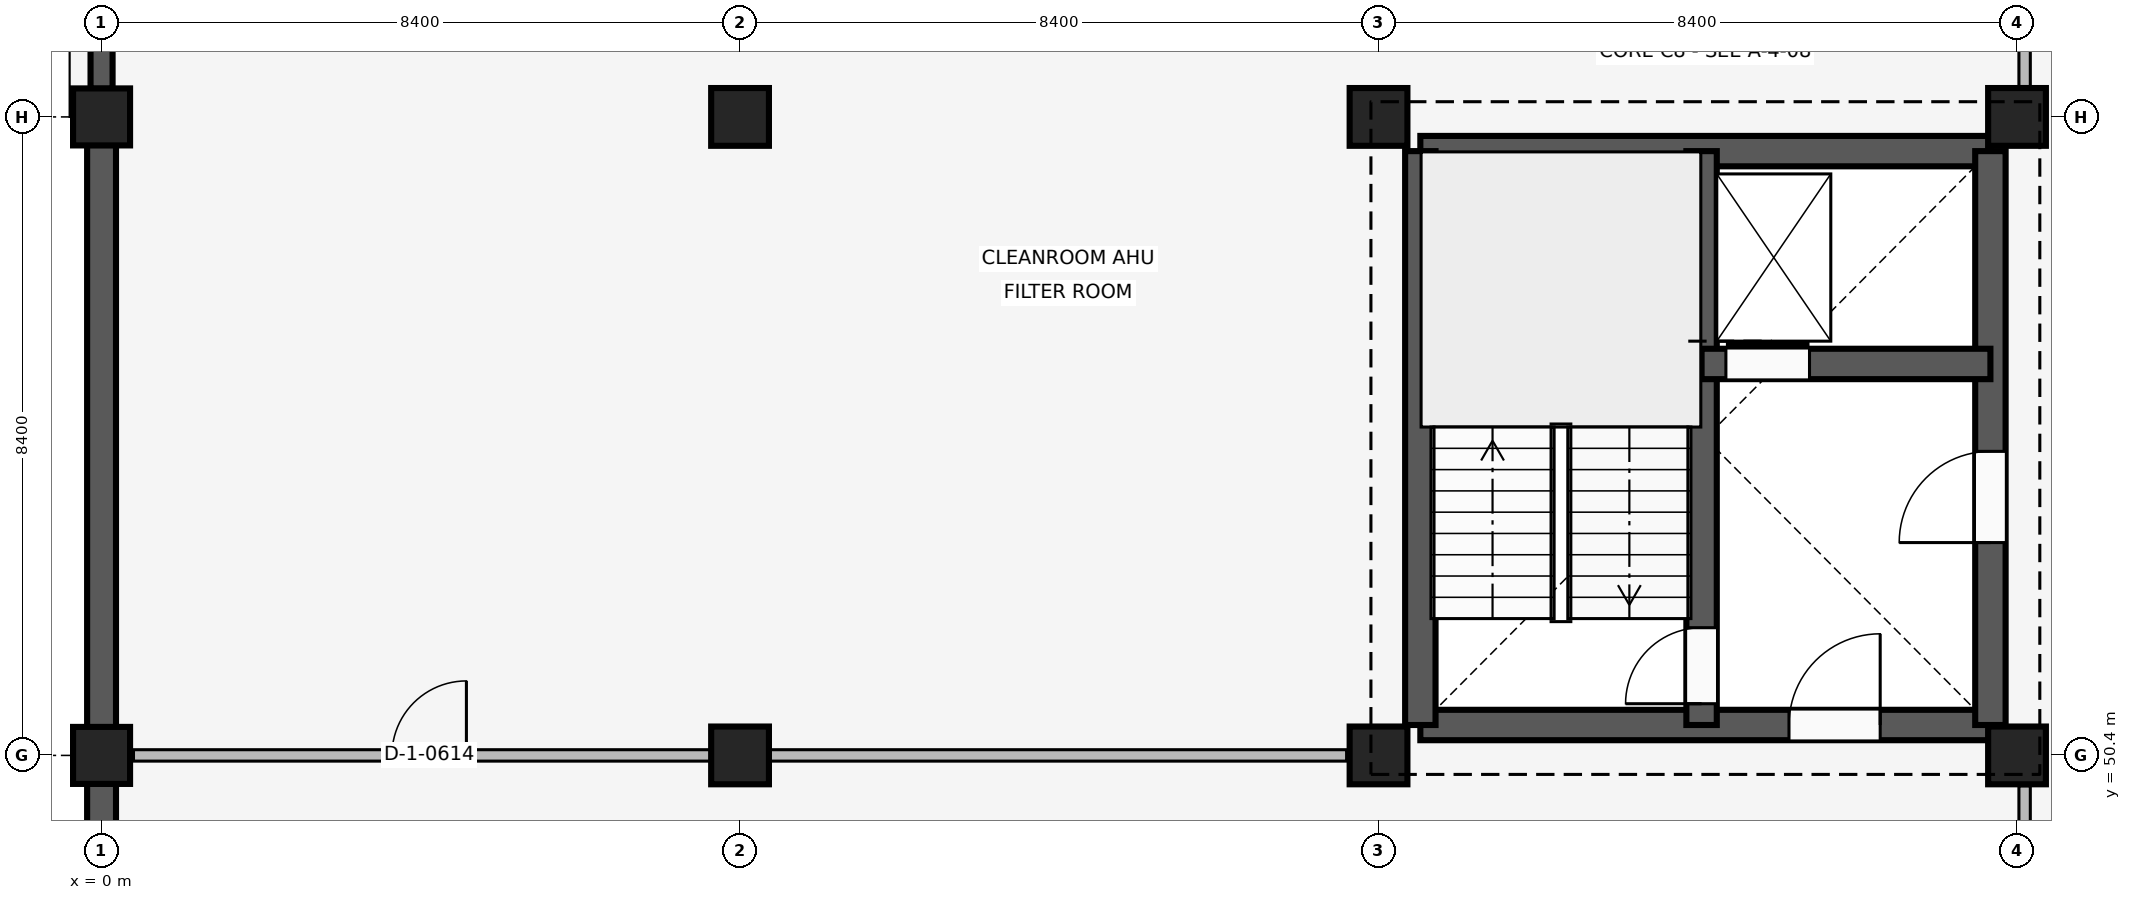
"""IFC4 building model, lengths in metres.
Left out: names, types, materials, properties, quantities, classifications, styles, units other than length and angle.
Written with IfcOpenShell. Run it as: python <this file> out.ifc"""

import sys

from ifc_helpers import new_model, si_unit, direction, frame, frame_2d, origin, origin_2d, place, context, subcontext, project, spatial, rectangle, extrude, element, fill, save


model = new_model("IFC4")
c1 = context("Model", 3, precision=1e-05, world=origin(), true_north=direction((0.0, 1.0)))
c2 = subcontext(c1, "Body", "Model", "MODEL_VIEW")
j1 = project(units=[si_unit("LENGTHUNIT", "METRE"), si_unit("PLANEANGLEUNIT", "RADIAN")], contexts=[c1])
p1 = place(None, origin())
s1 = spatial("IfcSite", under=j1, at=p1, CompositionType="ELEMENT")
p2 = place(p1, origin())
s2 = spatial("IfcBuilding", under=s1, at=p2, CompositionType="ELEMENT")
p3 = place(p2, frame((0.0, 0.0, 4.8)))
s3 = spatial("IfcBuildingStorey", under=s2, at=p3, CompositionType="ELEMENT", Elevation=4.8)
for number, where, z_axis, x_axis in (
    (1, (0.0, 50.4, 0.0), (0.0, 0.0, 1.0), (1.0, 0.0, 0.0)),
    (2, (0.0, 58.8, 0.0), (0.0, 0.0, 1.0), (1.0, 0.0, 0.0)),
):
    element("IfcColumn", number, at=place(p3, frame(where, z_axis=z_axis, x_axis=x_axis)), inside=s3, PredefinedType="COLUMN", context=c2, shape_type="SweptSolid", body=[
        extrude(rectangle(XDim=0.75, YDim=0.75, at=origin_2d()), origin(), (0.0, 0.0, 1.0), 3.3),
    ])
for number, where, z_axis, x_axis in (
    (3, (8.4, 50.4, 0.0), (0.0, 0.0, 1.0), (1.0, 0.0, 0.0)),
    (4, (8.4, 58.8, 0.0), (0.0, 0.0, 1.0), (1.0, 0.0, 0.0)),
    (5, (16.8, 50.4, 0.0), (0.0, 0.0, 1.0), (1.0, 0.0, 0.0)),
    (6, (16.8, 58.8, 0.0), (0.0, 0.0, 1.0), (1.0, 0.0, 0.0)),
    (7, (25.2, 50.4, 0.0), (0.0, 0.0, 1.0), (1.0, 0.0, 0.0)),
    (8, (25.2, 58.8, 0.0), (0.0, 0.0, 1.0), (1.0, 0.0, 0.0)),
):
    element("IfcColumn", number, at=place(p3, frame(where, z_axis=z_axis, x_axis=x_axis)), inside=s3, PredefinedType="COLUMN", context=c2, shape_type="SweptSolid", body=[
        extrude(rectangle(XDim=0.76, YDim=0.76, at=origin_2d()), origin(), (0.0, 0.0, 1.0), 3.3),
    ])
for number, where, z_axis, x_axis in (
    (9, (0.0, 42.37, 0.0), (0.0, 0.0, 1.0), (0.0, 1.0, 0.0)),
    (10, (0.0, 50.77, 0.0), (0.0, 0.0, 1.0), (0.0, 1.0, 0.0)),
):
    element("IfcWall", number, at=place(p3, frame(where, z_axis=z_axis, x_axis=x_axis)), inside=s3, PredefinedType="SOLIDWALL", context=c2, shape_type="SweptSolid", body=[
        extrude(rectangle(XDim=7.66, YDim=0.38, at=frame_2d((3.83, 0.0))), origin(), (0.0, 0.0, 1.0), 2.42),
    ])
p4 = place(p3, frame((0.0, 59.17, 0.0), z_axis=(0.0, 0.0, 1.0), x_axis=(0.0, 1.0, 0.0)))
e11 = element("IfcWall", 11, at=p4, inside=s3, PredefinedType="SOLIDWALL", context=c2, shape_type="SweptSolid", body=[
    extrude(rectangle(XDim=7.66, YDim=0.29, at=frame_2d((3.83, 0.0))), origin(), (0.0, 0.0, 1.0), 2.42),
])
p5 = place(p4, frame((1.188, 0.0, 1.05)))
e12 = element("IfcOpeningElement", 12, at=p5, cuts=e11, PredefinedType="OPENING", context=c2, shape_type="SweptSolid", body=[
    extrude(rectangle(XDim=1.3, YDim=0.75, at=frame_2d((0.65, 0.375))), frame((0.0, 0.155, 0.0), z_axis=(0.0, -1.0, 0.0), x_axis=(1.0, 0.0, 0.0)), (0.0, 0.0, 1.0), 0.31),
])
p6 = place(p4, frame((5.172, 0.0, 1.05)))
e13 = element("IfcOpeningElement", 13, at=p6, cuts=e11, PredefinedType="OPENING", context=c2, shape_type="SweptSolid", body=[
    extrude(rectangle(XDim=1.3, YDim=0.75, at=frame_2d((0.65, 0.375))), frame((0.0, 0.155, 0.0), z_axis=(0.0, -1.0, 0.0), x_axis=(1.0, 0.0, 0.0)), (0.0, 0.0, 1.0), 0.31),
])
p7 = place(p3, frame((17.35, 50.8, 0.0), z_axis=(0.0, 0.0, 1.0), x_axis=(1.0, 0.0, 0.0)))
e14 = element("IfcWall", 14, at=p7, inside=s3, PredefinedType="SHEAR", context=c2, shape_type="SweptSolid", body=[
    extrude(rectangle(XDim=7.5, YDim=0.4, at=frame_2d((3.75, 0.0))), origin(), (0.0, 0.0, 1.0), 3.02),
])
p8 = place(p7, frame((4.85, 0.0, 0.0)))
e15 = element("IfcOpeningElement", 15, at=p8, cuts=e14, PredefinedType="OPENING", context=c2, shape_type="SweptSolid", body=[
    extrude(rectangle(XDim=1.2, YDim=2.1, at=frame_2d((0.6, 1.05))), frame((0.0, 0.21, 0.0), z_axis=(0.0, -1.0, 0.0), x_axis=(1.0, 0.0, 0.0)), (0.0, 0.0, 1.0), 0.42),
])
p9 = place(p3, frame((17.35, 58.35, 0.0), z_axis=(0.0, 0.0, 1.0), x_axis=(1.0, 0.0, 0.0)))
e16 = element("IfcWall", 16, at=p9, inside=s3, PredefinedType="SHEAR", context=c2, shape_type="SweptSolid", body=[
    extrude(rectangle(XDim=7.5, YDim=0.4, at=frame_2d((3.75, 0.0))), origin(), (0.0, 0.0, 1.0), 3.02),
])
p10 = place(p3, frame((17.35, 50.8, 0.0), z_axis=(0.0, 0.0, 1.0), x_axis=(0.0, 1.0, 0.0)))
e17 = element("IfcWall", 17, at=p10, inside=s3, PredefinedType="SHEAR", context=c2, shape_type="SweptSolid", body=[
    extrude(rectangle(XDim=7.55, YDim=0.4, at=frame_2d((3.775, 0.0))), origin(), (0.0, 0.0, 1.0), 3.02),
])
p11 = place(p3, frame((24.85, 50.8, 0.0), z_axis=(0.0, 0.0, 1.0), x_axis=(0.0, 1.0, 0.0)))
e18 = element("IfcWall", 18, at=p11, inside=s3, PredefinedType="SHEAR", context=c2, shape_type="SweptSolid", body=[
    extrude(rectangle(XDim=7.55, YDim=0.4, at=frame_2d((3.775, 0.0))), origin(), (0.0, 0.0, 1.0), 3.02),
])
p12 = place(p11, frame((2.4, 0.0, 0.0)))
e19 = element("IfcOpeningElement", 19, at=p12, cuts=e18, PredefinedType="OPENING", context=c2, shape_type="SweptSolid", body=[
    extrude(rectangle(XDim=1.2, YDim=2.2, at=frame_2d((0.6, 1.1))), frame((0.0, 0.21, 0.0), z_axis=(0.0, -1.0, 0.0), x_axis=(1.0, 0.0, 0.0)), (0.0, 0.0, 1.0), 0.42),
])
p13 = place(p3, frame((21.05, 50.8, 0.0), z_axis=(0.0, 0.0, 1.0), x_axis=(0.0, 1.0, 0.0)))
e20 = element("IfcWall", 20, at=p13, inside=s3, PredefinedType="SHEAR", context=c2, shape_type="SweptSolid", body=[
    extrude(rectangle(XDim=7.55, YDim=0.4, at=frame_2d((3.775, 0.0))), origin(), (0.0, 0.0, 1.0), 3.02),
])
p14 = place(p13, frame((0.28, 0.0, 0.0)))
e21 = element("IfcOpeningElement", 21, at=p14, cuts=e20, PredefinedType="OPENING", context=c2, shape_type="SweptSolid", body=[
    extrude(rectangle(XDim=1.0, YDim=2.15, at=frame_2d((0.5, 1.075))), frame((0.0, 0.21, 0.0), z_axis=(0.0, -1.0, 0.0), x_axis=(1.0, 0.0, 0.0)), (0.0, 0.0, 1.0), 0.42),
])
p15 = place(p3, frame((21.05, 55.55, 0.0), z_axis=(0.0, 0.0, 1.0), x_axis=(1.0, 0.0, 0.0)))
e22 = element("IfcWall", 22, at=p15, inside=s3, PredefinedType="SHEAR", context=c2, shape_type="SweptSolid", body=[
    extrude(rectangle(XDim=3.8, YDim=0.4, at=frame_2d((1.9, 0.0))), origin(), (0.0, 0.0, 1.0), 3.02),
])
p16 = place(p15, frame((0.32, 0.0, 0.0)))
e23 = element("IfcOpeningElement", 23, at=p16, cuts=e22, PredefinedType="OPENING", context=c2, shape_type="SweptSolid", body=[
    extrude(rectangle(XDim=1.1, YDim=2.15, at=frame_2d((0.55, 1.075))), frame((0.0, 0.21, 0.0), z_axis=(0.0, -1.0, 0.0), x_axis=(1.0, 0.0, 0.0)), (0.0, 0.0, 1.0), 0.42),
])
p17 = place(p3, frame((25.3, 25.6, 0.0), z_axis=(0.0, 0.0, 1.0), x_axis=(0.0, 1.0, 0.0)))
e24 = element("IfcWall", 24, at=p17, inside=s3, PredefinedType="PARTITIONING", context=c2, shape_type="SweptSolid", body=[
    extrude(rectangle(XDim=24.4, YDim=0.15, at=frame_2d((12.2, 0.0))), origin(), (0.0, 0.0, 1.0), 2.4),
])
p18 = place(p17, frame((3.4, 0.0, 0.0)))
e25 = element("IfcOpeningElement", 25, at=p18, cuts=e24, PredefinedType="OPENING", context=c2, shape_type="SweptSolid", body=[
    extrude(rectangle(XDim=0.98, YDim=2.05, at=frame_2d((0.49, 1.025))), frame((0.0, 0.085, 0.0), z_axis=(0.0, -1.0, 0.0), x_axis=(1.0, 0.0, 0.0)), (0.0, 0.0, 1.0), 0.17),
])
p19 = place(p3, frame((0.42, 50.4, 0.0), z_axis=(0.0, 0.0, 1.0), x_axis=(1.0, 0.0, 0.0)))
e26 = element("IfcWall", 26, at=p19, inside=s3, PredefinedType="PARTITIONING", context=c2, shape_type="SweptSolid", body=[
    extrude(rectangle(XDim=15.96, YDim=0.15, at=frame_2d((7.98, 0.0))), origin(), (0.0, 0.0, 1.0), 2.4),
])
p20 = place(p19, frame((3.4, 0.0, 0.0)))
e27 = element("IfcOpeningElement", 27, at=p20, cuts=e26, PredefinedType="OPENING", context=c2, shape_type="SweptSolid", body=[
    extrude(rectangle(XDim=0.98, YDim=2.05, at=frame_2d((0.49, 1.025))), frame((0.0, 0.085, 0.0), z_axis=(0.0, -1.0, 0.0), x_axis=(1.0, 0.0, 0.0)), (0.0, 0.0, 1.0), 0.17),
])
p21 = place(p3, frame((25.3, 59.2, 0.0), z_axis=(0.0, 0.0, 1.0), x_axis=(0.0, 1.0, 0.0)))
e28 = element("IfcWall", 28, at=p21, inside=s3, PredefinedType="PARTITIONING", context=c2, shape_type="SweptSolid", body=[
    extrude(rectangle(XDim=16.0, YDim=0.15, at=frame_2d((8.0, 0.0))), origin(), (0.0, 0.0, 1.0), 2.4),
])
p22 = place(p21, frame((3.4, 0.0, 0.0)))
e29 = element("IfcOpeningElement", 29, at=p22, cuts=e28, PredefinedType="OPENING", context=c2, shape_type="SweptSolid", body=[
    extrude(rectangle(XDim=1.18, YDim=2.2, at=frame_2d((0.59, 1.1))), frame((0.0, 0.085, 0.0), z_axis=(0.0, -1.0, 0.0), x_axis=(1.0, 0.0, 0.0)), (0.0, 0.0, 1.0), 0.17),
])
p23 = place(p12, origin())
e30 = element("IfcDoor", 30, at=p23, inside=s3, OperationType="SINGLE_SWING_LEFT", PredefinedType="DOOR", context=c2, shape_type="SweptSolid", body=[
    extrude(rectangle(XDim=1.2, YDim=2.2, at=frame_2d((0.6, 1.1))), frame((0.0, 0.025, 0.0), z_axis=(0.0, -1.0, 0.0), x_axis=(1.0, 0.0, 0.0)), (0.0, 0.0, 1.0), 0.05),
])
fill(e19, e30)
p24 = place(p8, origin())
e31 = element("IfcDoor", 31, at=p24, inside=s3, OperationType="SINGLE_SWING_RIGHT", PredefinedType="DOOR", context=c2, shape_type="SweptSolid", body=[
    extrude(rectangle(XDim=1.2, YDim=2.1, at=frame_2d((0.6, 1.05))), frame((0.0, 0.025, 0.0), z_axis=(0.0, -1.0, 0.0), x_axis=(1.0, 0.0, 0.0)), (0.0, 0.0, 1.0), 0.05),
])
fill(e15, e31)
p25 = place(p14, origin())
e32 = element("IfcDoor", 32, at=p25, inside=s3, OperationType="SINGLE_SWING_LEFT", PredefinedType="DOOR", context=c2, shape_type="SweptSolid", body=[
    extrude(rectangle(XDim=1.0, YDim=2.15, at=frame_2d((0.5, 1.075))), frame((0.0, 0.025, 0.0), z_axis=(0.0, -1.0, 0.0), x_axis=(1.0, 0.0, 0.0)), (0.0, 0.0, 1.0), 0.05),
])
fill(e21, e32)
p26 = place(p16, origin())
e33 = element("IfcDoor", 33, at=p26, inside=s3, OperationType="SLIDING_TO_LEFT", PredefinedType="DOOR", context=c2, shape_type="SweptSolid", body=[
    extrude(rectangle(XDim=1.1, YDim=2.15, at=frame_2d((0.55, 1.075))), frame((0.0, 0.025, 0.0), z_axis=(0.0, -1.0, 0.0), x_axis=(1.0, 0.0, 0.0)), (0.0, 0.0, 1.0), 0.05),
])
fill(e23, e33)
p27 = place(p20, origin())
e34 = element("IfcDoor", 34, at=p27, inside=s3, OperationType="SINGLE_SWING_RIGHT", PredefinedType="DOOR", context=c2, shape_type="SweptSolid", body=[
    extrude(rectangle(XDim=0.98, YDim=2.05, at=frame_2d((0.49, 1.025))), frame((0.0, 0.025, 0.0), z_axis=(0.0, -1.0, 0.0), x_axis=(1.0, 0.0, 0.0)), (0.0, 0.0, 1.0), 0.05),
])
fill(e27, e34)
save(model, sys.argv[1])
